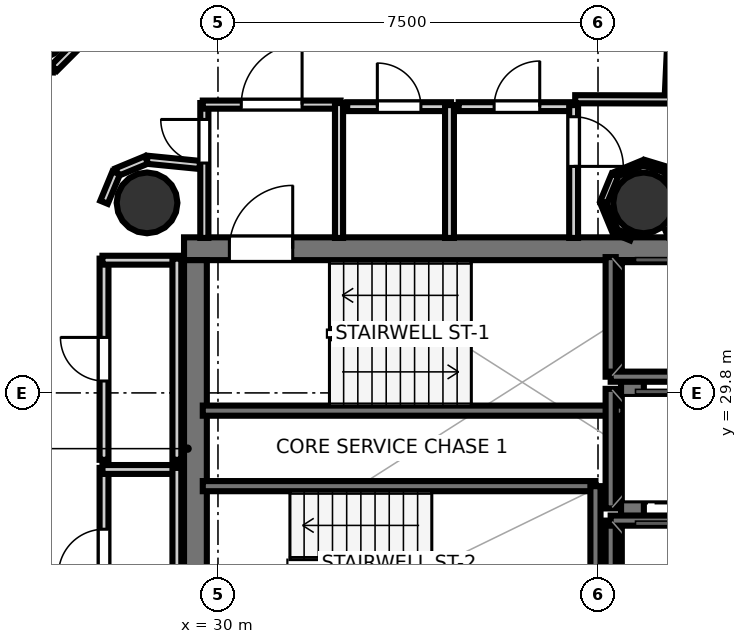
"""IFC4 building model, lengths in metres.
Left out: names, types, materials, properties, quantities, classifications, styles, units other than length and angle.
Written with IfcOpenShell. Run it as: python <this file> out.ifc"""

import sys

from ifc_helpers import new_model, si_unit, direction, frame, frame_2d, origin, origin_2d, place, context, subcontext, project, spatial, rectangle, hollow_circle, extrude, element, fill, save


model = new_model("IFC4")
c1 = context("Model", 3, precision=1e-05, world=origin(), true_north=direction((0.0, 1.0)))
c2 = subcontext(c1, "Body", "Model", "MODEL_VIEW")
j1 = project(units=[si_unit("LENGTHUNIT", "METRE"), si_unit("PLANEANGLEUNIT", "RADIAN")], contexts=[c1])
p1 = place(None, origin())
s1 = spatial("IfcSite", under=j1, at=p1, CompositionType="ELEMENT")
p2 = place(p1, origin())
s2 = spatial("IfcBuilding", under=s1, at=p2, CompositionType="ELEMENT")
p3 = place(p2, frame((0.0, 0.0, 226.2)))
s3 = spatial("IfcBuildingStorey", under=s2, at=p3, CompositionType="ELEMENT", Elevation=226.2)
p4 = place(p3, frame((29.33, 32.645, 0.0), z_axis=(0.0, 0.0, 1.0), x_axis=(1.0, 0.0, 0.0)))
e1 = element("IfcWall", 1, at=p4, inside=s3, PredefinedType="SHEAR", context=c2, shape_type="SweptSolid", body=[
    extrude(rectangle(XDim=10.52, YDim=0.45, at=frame_2d((5.26, 0.0))), origin(), (0.0, 0.0, 1.0), 3.4),
])
p5 = place(p4, frame((0.895, 0.0, 0.0)))
e2 = element("IfcOpeningElement", 2, at=p5, cuts=e1, PredefinedType="OPENING", context=c2, shape_type="SweptSolid", body=[
    extrude(rectangle(XDim=1.25, YDim=2.15, at=frame_2d((0.625, 1.075))), frame((0.0, 0.235, 0.0), z_axis=(0.0, -1.0, 0.0), x_axis=(1.0, 0.0, 0.0)), (0.0, 0.0, 1.0), 0.47),
])
for number, where, z_axis, x_axis in (
    (3, (29.555, 24.98, 0.0), (0.0, 0.0, 1.0), (0.0, 1.0, 0.0)),
    (4, (38.18, 24.98, 0.0), (0.0, 0.0, 1.0), (0.0, 1.0, 0.0)),
):
    element("IfcWall", number, at=place(p3, frame(where, z_axis=z_axis, x_axis=x_axis)), inside=s3, PredefinedType="SHEAR", context=c2, shape_type="SweptSolid", body=[
        extrude(rectangle(XDim=7.44, YDim=0.45, at=frame_2d((3.72, 0.0))), origin(), (0.0, 0.0, 1.0), 3.4),
    ])
for number, where, z_axis, x_axis in (
    (5, (28.6, 33.55, 0.0), (0.0, 0.0, 1.0), (1.0, 0.0, 0.0)),
    (6, (38.4, 33.55, 0.0), (0.0, 0.0, 1.0), (1.0, 0.0, 0.0)),
    (7, (26.431, 36.992, 0.0), (0.0, 0.0, 1.0), (1.0, 0.0, 0.0)),
):
    element("IfcColumn", number, at=place(p3, frame(where, z_axis=z_axis, x_axis=x_axis)), inside=s3, PredefinedType="COLUMN", context=c2, shape_type="SweptSolid", body=[
        extrude(hollow_circle(Radius=0.6, WallThickness=0.03, at=origin_2d()), origin(), (0.0, 0.0, 1.0), 3.7),
    ])
p6 = place(p3, frame((29.7, 29.45, 0.0), z_axis=(0.0, 0.0, 1.0), x_axis=(1.0, 0.0, 0.0)))
e8 = element("IfcWall", 8, at=p6, inside=s3, PredefinedType="SOLIDWALL", context=c2, shape_type="SweptSolid", body=[
    extrude(rectangle(XDim=8.3, YDim=0.2, at=frame_2d((4.15, 0.0))), origin(), (0.0, 0.0, 1.0), 3.4),
])
p7 = place(p3, frame((29.7, 27.96, 0.0), z_axis=(0.0, 0.0, 1.0), x_axis=(1.0, 0.0, 0.0)))
e9 = element("IfcWall", 9, at=p7, inside=s3, PredefinedType="SOLIDWALL", context=c2, shape_type="SweptSolid", body=[
    extrude(rectangle(XDim=7.75, YDim=0.2, at=frame_2d((3.875, 0.0))), origin(), (0.0, 0.0, 1.0), 3.4),
])
p8 = place(p3, frame((37.45, 24.9, 0.0), z_axis=(0.0, 0.0, 1.0), x_axis=(0.0, 1.0, 0.0)))
e10 = element("IfcWall", 10, at=p8, inside=s3, PredefinedType="SOLIDWALL", context=c2, shape_type="SweptSolid", body=[
    extrude(rectangle(XDim=3.06, YDim=0.2, at=frame_2d((1.53, 0.0))), origin(), (0.0, 0.0, 1.0), 3.4),
])
p9 = place(p3, frame((37.75, 30.12, 0.0), z_axis=(0.0, 0.0, 1.0), x_axis=(0.0, 1.0, 0.0)))
e11 = element("IfcWall", 11, at=p9, inside=s3, PredefinedType="SOLIDWALL", context=c2, shape_type="SweptSolid", body=[
    extrude(rectangle(XDim=2.36, YDim=0.2, at=frame_2d((1.18, 0.0))), origin(), (0.0, 0.0, 1.0), 3.4),
])
p10 = place(p3, frame((37.75, 30.12, 0.0), z_axis=(0.0, 0.0, 1.0), x_axis=(1.0, 0.0, 0.0)))
e12 = element("IfcWall", 12, at=p10, inside=s3, PredefinedType="SOLIDWALL", context=c2, shape_type="SweptSolid", body=[
    extrude(rectangle(XDim=2.1, YDim=0.2, at=frame_2d((1.05, 0.0))), origin(), (0.0, 0.0, 1.0), 3.4),
])
p11 = place(p3, frame((37.75, 24.92, 0.0), z_axis=(0.0, 0.0, 1.0), x_axis=(0.0, 1.0, 0.0)))
e13 = element("IfcWall", 13, at=p11, inside=s3, PredefinedType="SOLIDWALL", context=c2, shape_type="SweptSolid", body=[
    extrude(rectangle(XDim=2.36, YDim=0.2, at=frame_2d((1.18, 0.0))), origin(), (0.0, 0.0, 1.0), 3.4),
])
p12 = place(p3, frame((37.75, 27.28, 0.0), z_axis=(0.0, 0.0, 1.0), x_axis=(1.0, 0.0, 0.0)))
e14 = element("IfcWall", 14, at=p12, inside=s3, PredefinedType="SOLIDWALL", context=c2, shape_type="SweptSolid", body=[
    extrude(rectangle(XDim=2.1, YDim=0.2, at=frame_2d((1.05, 0.0))), origin(), (0.0, 0.0, 1.0), 3.4),
])
p13 = place(p3, frame((37.75, 27.52, 0.0), z_axis=(0.0, 0.0, 1.0), x_axis=(0.0, 1.0, 0.0)))
e15 = element("IfcWall", 15, at=p13, inside=s3, PredefinedType="SOLIDWALL", context=c2, shape_type="SweptSolid", body=[
    extrude(rectangle(XDim=2.36, YDim=0.2, at=frame_2d((1.18, 0.0))), origin(), (0.0, 0.0, 1.0), 3.4),
])
p14 = place(p3, frame((29.731, 32.858, 0.0), z_axis=(0.0, 0.0, 1.0), x_axis=(0.0, 1.0, 0.0)))
e16 = element("IfcWall", 16, at=p14, inside=s3, PredefinedType="PARTITIONING", context=c2, shape_type="SweptSolid", body=[
    extrude(rectangle(XDim=2.662, YDim=0.16, at=frame_2d((1.331, 0.0))), origin(), (0.0, 0.0, 1.0), 2.72),
])
p15 = place(p14, frame((1.478, 0.0, 0.0)))
e17 = element("IfcOpeningElement", 17, at=p15, cuts=e16, PredefinedType="OPENING", context=c2, shape_type="SweptSolid", body=[
    extrude(rectangle(XDim=0.86, YDim=2.05, at=frame_2d((0.43, 1.025))), frame((0.0, 0.09, 0.0), z_axis=(0.0, -1.0, 0.0), x_axis=(1.0, 0.0, 0.0)), (0.0, 0.0, 1.0), 0.18),
])
p16 = place(p3, frame((29.7, 35.489, 0.0), z_axis=(0.0, 0.0, 1.0), x_axis=(1.0, 0.0, 0.0)))
e18 = element("IfcWall", 18, at=p16, inside=s3, PredefinedType="PARTITIONING", context=c2, shape_type="SweptSolid", body=[
    extrude(rectangle(XDim=2.72, YDim=0.16, at=frame_2d((1.36, 0.0))), origin(), (0.0, 0.0, 1.0), 2.72),
])
p17 = place(p16, frame((0.76, 0.0, 0.0)))
e19 = element("IfcOpeningElement", 19, at=p17, cuts=e18, PredefinedType="OPENING", context=c2, shape_type="SweptSolid", body=[
    extrude(rectangle(XDim=1.2, YDim=2.15, at=frame_2d((0.6, 1.075))), frame((0.0, 0.09, 0.0), z_axis=(0.0, -1.0, 0.0), x_axis=(1.0, 0.0, 0.0)), (0.0, 0.0, 1.0), 0.18),
])
p18 = place(p3, frame((32.389, 35.52, 0.0), z_axis=(0.0, 0.0, 1.0), x_axis=(0.0, -1.0, 0.0)))
e20 = element("IfcWall", 20, at=p18, inside=s3, PredefinedType="PARTITIONING", context=c2, shape_type="SweptSolid", body=[
    extrude(rectangle(XDim=2.662, YDim=0.16, at=frame_2d((1.331, 0.0))), origin(), (0.0, 0.0, 1.0), 2.72),
])
p19 = place(p3, frame((32.55, 35.449, 0.0), z_axis=(0.0, 0.0, 1.0), x_axis=(1.0, 0.0, 0.0)))
e21 = element("IfcWall", 21, at=p19, inside=s3, PredefinedType="PLUMBINGWALL", context=c2, shape_type="SweptSolid", body=[
    extrude(rectangle(XDim=2.05, YDim=0.175, at=frame_2d((1.025, 0.0))), origin(), (0.0, 0.0, 1.0), 2.72),
])
p20 = place(p19, frame((0.595, 0.0, 0.0)))
e22 = element("IfcOpeningElement", 22, at=p20, cuts=e21, PredefinedType="OPENING", context=c2, shape_type="SweptSolid", body=[
    extrude(rectangle(XDim=0.86, YDim=2.05, at=frame_2d((0.43, 1.025))), frame((0.0, 0.097, 0.0), z_axis=(0.0, -1.0, 0.0), x_axis=(1.0, 0.0, 0.0)), (0.0, 0.0, 1.0), 0.195),
])
p21 = place(p3, frame((34.569, 35.48, 0.0), z_axis=(0.0, 0.0, 1.0), x_axis=(0.0, -1.0, 0.0)))
e23 = element("IfcWall", 23, at=p21, inside=s3, PredefinedType="PLUMBINGWALL", context=c2, shape_type="SweptSolid", body=[
    extrude(rectangle(XDim=2.622, YDim=0.175, at=frame_2d((1.311, 0.0))), origin(), (0.0, 0.0, 1.0), 2.72),
])
p22 = place(p3, frame((34.75, 35.449, 0.0), z_axis=(0.0, 0.0, 1.0), x_axis=(1.0, 0.0, 0.0)))
e24 = element("IfcWall", 24, at=p22, inside=s3, PredefinedType="PLUMBINGWALL", context=c2, shape_type="SweptSolid", body=[
    extrude(rectangle(XDim=2.3, YDim=0.175, at=frame_2d((1.15, 0.0))), origin(), (0.0, 0.0, 1.0), 2.72),
])
p23 = place(p22, frame((0.7, 0.0, 0.0)))
e25 = element("IfcOpeningElement", 25, at=p23, cuts=e24, PredefinedType="OPENING", context=c2, shape_type="SweptSolid", body=[
    extrude(rectangle(XDim=0.9, YDim=2.1, at=frame_2d((0.45, 1.05))), frame((0.0, 0.097, 0.0), z_axis=(0.0, -1.0, 0.0), x_axis=(1.0, 0.0, 0.0)), (0.0, 0.0, 1.0), 0.195),
])
p24 = place(p3, frame((37.019, 35.48, 0.0), z_axis=(0.0, 0.0, 1.0), x_axis=(0.0, -1.0, 0.0)))
e26 = element("IfcWall", 26, at=p24, inside=s3, PredefinedType="PLUMBINGWALL", context=c2, shape_type="SweptSolid", body=[
    extrude(rectangle(XDim=2.622, YDim=0.175, at=frame_2d((1.311, 0.0))), origin(), (0.0, 0.0, 1.0), 2.72),
])
p25 = place(p24, frame((0.23, 0.0, 0.0)))
e27 = element("IfcOpeningElement", 27, at=p25, cuts=e26, PredefinedType="OPENING", context=c2, shape_type="SweptSolid", body=[
    extrude(rectangle(XDim=0.98, YDim=2.1, at=frame_2d((0.49, 1.05))), frame((0.0, 0.097, 0.0), z_axis=(0.0, -1.0, 0.0), x_axis=(1.0, 0.0, 0.0)), (0.0, 0.0, 1.0), 0.195),
])
p26 = place(p3, frame((27.751, 25.0, 0.0), z_axis=(0.0, 0.0, 1.0), x_axis=(0.0, 1.0, 0.0)))
e28 = element("IfcWall", 28, at=p26, inside=s3, PredefinedType="PLUMBINGWALL", context=c2, shape_type="SweptSolid", body=[
    extrude(rectangle(XDim=3.32, YDim=0.175, at=frame_2d((1.66, 0.0))), origin(), (0.0, 0.0, 1.0), 2.72),
])
p27 = place(p26, frame((1.21, 0.0, 0.0)))
e29 = element("IfcOpeningElement", 29, at=p27, cuts=e28, PredefinedType="OPENING", context=c2, shape_type="SweptSolid", body=[
    extrude(rectangle(XDim=0.9, YDim=2.1, at=frame_2d((0.45, 1.05))), frame((0.0, 0.097, 0.0), z_axis=(0.0, -1.0, 0.0), x_axis=(1.0, 0.0, 0.0)), (0.0, 0.0, 1.0), 0.195),
])
p28 = place(p3, frame((27.72, 28.289, 0.0), z_axis=(0.0, 0.0, 1.0), x_axis=(1.0, 0.0, 0.0)))
e30 = element("IfcWall", 30, at=p28, inside=s3, PredefinedType="PLUMBINGWALL", context=c2, shape_type="SweptSolid", body=[
    extrude(rectangle(XDim=1.5, YDim=0.175, at=frame_2d((0.75, 0.0))), origin(), (0.0, 0.0, 1.0), 2.72),
])
p29 = place(p3, frame((29.189, 28.32, 0.0), z_axis=(0.0, 0.0, 1.0), x_axis=(0.0, -1.0, 0.0)))
e31 = element("IfcWall", 31, at=p29, inside=s3, PredefinedType="PLUMBINGWALL", context=c2, shape_type="SweptSolid", body=[
    extrude(rectangle(XDim=3.32, YDim=0.175, at=frame_2d((1.66, 0.0))), origin(), (0.0, 0.0, 1.0), 2.72),
])
p30 = place(p3, frame((27.751, 28.48, 0.0), z_axis=(0.0, 0.0, 1.0), x_axis=(0.0, 1.0, 0.0)))
e32 = element("IfcWall", 32, at=p30, inside=s3, PredefinedType="PLUMBINGWALL", context=c2, shape_type="SweptSolid", body=[
    extrude(rectangle(XDim=3.97, YDim=0.175, at=frame_2d((1.985, 0.0))), origin(), (0.0, 0.0, 1.0), 2.72),
])
p31 = place(p30, frame((1.555, 0.0, 0.0)))
e33 = element("IfcOpeningElement", 33, at=p31, cuts=e32, PredefinedType="OPENING", context=c2, shape_type="SweptSolid", body=[
    extrude(rectangle(XDim=0.86, YDim=2.05, at=frame_2d((0.43, 1.025))), frame((0.0, 0.097, 0.0), z_axis=(0.0, -1.0, 0.0), x_axis=(1.0, 0.0, 0.0)), (0.0, 0.0, 1.0), 0.195),
])
p32 = place(p3, frame((27.72, 32.419, 0.0), z_axis=(0.0, 0.0, 1.0), x_axis=(1.0, 0.0, 0.0)))
e34 = element("IfcWall", 34, at=p32, inside=s3, PredefinedType="PLUMBINGWALL", context=c2, shape_type="SweptSolid", body=[
    extrude(rectangle(XDim=1.5, YDim=0.175, at=frame_2d((0.75, 0.0))), origin(), (0.0, 0.0, 1.0), 2.72),
])
p33 = place(p3, frame((29.189, 32.45, 0.0), z_axis=(0.0, 0.0, 1.0), x_axis=(0.0, -1.0, 0.0)))
e35 = element("IfcWall", 35, at=p33, inside=s3, PredefinedType="PLUMBINGWALL", context=c2, shape_type="SweptSolid", body=[
    extrude(rectangle(XDim=3.97, YDim=0.175, at=frame_2d((1.985, 0.0))), origin(), (0.0, 0.0, 1.0), 2.72),
])
p34 = place(p3, frame((38.979, 37.424, 0.0), z_axis=(0.0, 0.0, 1.0), x_axis=(-0.046339891036, -0.998925730222, 0.0)))
e36 = element("IfcWall", 36, at=p34, inside=s3, PredefinedType="PARTITIONING", context=c2, shape_type="SweptSolid", body=[
    extrude(rectangle(XDim=1.865, YDim=0.16, at=frame_2d((0.933, 0.0))), origin(), (0.0, 0.0, 1.0), 2.72),
])
p35 = place(p3, frame((38.924, 35.591, 0.0), z_axis=(0.0, 0.0, 1.0), x_axis=(-0.999997249133, 0.002345576034, 0.0)))
e37 = element("IfcWall", 37, at=p35, inside=s3, PredefinedType="PARTITIONING", context=c2, shape_type="SweptSolid", body=[
    extrude(rectangle(XDim=1.874, YDim=0.16, at=frame_2d((0.937, 0.0))), origin(), (0.0, 0.0, 1.0), 2.72),
])
p36 = place(p3, frame((29.641, 34.299, 0.0), z_axis=(0.0, 0.0, 1.0), x_axis=(-0.995179827095, 0.098066873836, 0.0)))
e38 = element("IfcWall", 38, at=p36, inside=s3, PredefinedType="PARTITIONING", context=c2, shape_type="SweptSolid", body=[
    extrude(rectangle(XDim=1.043, YDim=0.16, at=frame_2d((0.521, 0.0))), origin(), (0.0, 0.0, 1.0), 2.72),
])
p37 = place(p3, frame((28.588, 34.399, 0.0), z_axis=(0.0, 0.0, 1.0), x_axis=(-0.923846138666, -0.382764042293, 0.0)))
e39 = element("IfcWall", 39, at=p37, inside=s3, PredefinedType="PARTITIONING", context=c2, shape_type="SweptSolid", body=[
    extrude(rectangle(XDim=0.628, YDim=0.16, at=frame_2d((0.314, 0.0))), origin(), (0.0, 0.0, 1.0), 2.72),
])
p38 = place(p3, frame((27.991, 34.142, 0.0), z_axis=(0.0, 0.0, 1.0), x_axis=(-0.382569489008, -0.923926721164, 0.0)))
e40 = element("IfcWall", 40, at=p38, inside=s3, PredefinedType="PARTITIONING", context=c2, shape_type="SweptSolid", body=[
    extrude(rectangle(XDim=0.627, YDim=0.16, at=frame_2d((0.313, 0.0))), origin(), (0.0, 0.0, 1.0), 2.72),
])
p39 = place(p3, frame((25.449, 36.238, 0.0), z_axis=(0.0, 0.0, 1.0), x_axis=(0.999651698073, -0.026390955635, 0.0)))
e41 = element("IfcWall", 41, at=p39, inside=s3, PredefinedType="PARTITIONING", context=c2, shape_type="SweptSolid", body=[
    extrude(rectangle(XDim=1.295, YDim=0.16, at=frame_2d((0.647, 0.0))), origin(), (0.0, 0.0, 1.0), 2.72),
])
p40 = place(p3, frame((26.767, 36.212, 0.0), z_axis=(0.0, 0.0, 1.0), x_axis=(0.707106781187, 0.707106781187, 0.0)))
e42 = element("IfcWall", 42, at=p40, inside=s3, PredefinedType="PARTITIONING", context=c2, shape_type="SweptSolid", body=[
    extrude(rectangle(XDim=0.628, YDim=0.16, at=frame_2d((0.314, 0.0))), origin(), (0.0, 0.0, 1.0), 2.72),
])
p41 = place(p3, frame((39.166, 33.733, 0.0), z_axis=(0.0, 0.0, 1.0), x_axis=(-0.563162199293, 0.826346378517, 0.0)))
e43 = element("IfcWall", 43, at=p41, inside=s3, PredefinedType="PARTITIONING", context=c2, shape_type="SweptSolid", body=[
    extrude(rectangle(XDim=0.564, YDim=0.14, at=frame_2d((0.282, 0.0))), origin(), (0.0, 0.0, 1.0), 2.72),
])
p42 = place(p3, frame((38.831, 34.212, 0.0), z_axis=(0.0, 0.0, 1.0), x_axis=(-0.957061618741, 0.289884559665, 0.0)))
e44 = element("IfcWall", 44, at=p42, inside=s3, PredefinedType="PARTITIONING", context=c2, shape_type="SweptSolid", body=[
    extrude(rectangle(XDim=0.441, YDim=0.12, at=frame_2d((0.221, 0.0))), origin(), (0.0, 0.0, 1.0), 2.72),
])
p43 = place(p3, frame((38.388, 34.339, 0.0), z_axis=(0.0, 0.0, 1.0), x_axis=(-0.923894108428, -0.382648241093, 0.0)))
e45 = element("IfcWall", 45, at=p43, inside=s3, PredefinedType="PARTITIONING", context=c2, shape_type="SweptSolid", body=[
    extrude(rectangle(XDim=0.582, YDim=0.105, at=frame_2d((0.291, 0.0))), origin(), (0.0, 0.0, 1.0), 2.72),
])
p44 = place(p3, frame((37.834, 34.099, 0.0), z_axis=(0.0, 0.0, 1.0), x_axis=(-0.382796622927, -0.923832639322, 0.0)))
e46 = element("IfcWall", 46, at=p44, inside=s3, PredefinedType="PARTITIONING", context=c2, shape_type="SweptSolid", body=[
    extrude(rectangle(XDim=0.582, YDim=0.14, at=frame_2d((0.291, 0.0))), origin(), (0.0, 0.0, 1.0), 2.72),
])
p45 = place(p3, frame((37.611, 33.538, 0.0), z_axis=(0.0, 0.0, 1.0), x_axis=(0.382796622927, -0.923832639322, 0.0)))
e47 = element("IfcWall", 47, at=p45, inside=s3, PredefinedType="PARTITIONING", context=c2, shape_type="SweptSolid", body=[
    extrude(rectangle(XDim=0.582, YDim=0.12, at=frame_2d((0.291, 0.0))), origin(), (0.0, 0.0, 1.0), 2.72),
])
p46 = place(p3, frame((37.851, 32.984, 0.0), z_axis=(0.0, 0.0, 1.0), x_axis=(0.923908393326, -0.382613748761, 0.0)))
e48 = element("IfcWall", 48, at=p46, inside=s3, PredefinedType="PARTITIONING", context=c2, shape_type="SweptSolid", body=[
    extrude(rectangle(XDim=0.329, YDim=0.105, at=frame_2d((0.165, 0.0))), origin(), (0.0, 0.0, 1.0), 2.72),
])
p47 = place(p3, frame((38.855, 32.945, 0.0), z_axis=(0.0, 0.0, 1.0), x_axis=(0.924628481531, 0.380870281252, 0.0)))
e49 = element("IfcWall", 49, at=p47, inside=s3, PredefinedType="PARTITIONING", context=c2, shape_type="SweptSolid", body=[
    extrude(rectangle(XDim=0.102, YDim=0.14, at=frame_2d((0.051, 0.0))), origin(), (0.0, 0.0, 1.0), 2.72),
])
p48 = place(p5, origin())
e50 = element("IfcDoor", 50, at=p48, inside=s3, OperationType="SINGLE_SWING_RIGHT", PredefinedType="DOOR", context=c2, shape_type="SweptSolid", body=[
    extrude(rectangle(XDim=1.25, YDim=2.15, at=frame_2d((0.625, 1.075))), frame((0.0, 0.025, 0.0), z_axis=(0.0, -1.0, 0.0), x_axis=(1.0, 0.0, 0.0)), (0.0, 0.0, 1.0), 0.05),
])
fill(e2, e50)
p49 = place(p17, origin())
e51 = element("IfcDoor", 51, at=p49, inside=s3, OperationType="SINGLE_SWING_RIGHT", PredefinedType="DOOR", context=c2, shape_type="SweptSolid", body=[
    extrude(rectangle(XDim=1.2, YDim=2.15, at=frame_2d((0.6, 1.075))), frame((0.0, 0.025, 0.0), z_axis=(0.0, -1.0, 0.0), x_axis=(1.0, 0.0, 0.0)), (0.0, 0.0, 1.0), 0.05),
])
fill(e19, e51)
p50 = place(p20, origin())
e52 = element("IfcDoor", 52, at=p50, inside=s3, OperationType="SINGLE_SWING_LEFT", PredefinedType="DOOR", context=c2, shape_type="SweptSolid", body=[
    extrude(rectangle(XDim=0.86, YDim=2.05, at=frame_2d((0.43, 1.025))), frame((0.0, 0.025, 0.0), z_axis=(0.0, -1.0, 0.0), x_axis=(1.0, 0.0, 0.0)), (0.0, 0.0, 1.0), 0.05),
])
fill(e22, e52)
p51 = place(p23, origin())
e53 = element("IfcDoor", 53, at=p51, inside=s3, OperationType="SINGLE_SWING_RIGHT", PredefinedType="DOOR", context=c2, shape_type="SweptSolid", body=[
    extrude(rectangle(XDim=0.9, YDim=2.1, at=frame_2d((0.45, 1.05))), frame((0.0, 0.025, 0.0), z_axis=(0.0, -1.0, 0.0), x_axis=(1.0, 0.0, 0.0)), (0.0, 0.0, 1.0), 0.05),
])
fill(e25, e53)
p52 = place(p27, origin())
e54 = element("IfcDoor", 54, at=p52, inside=s3, OperationType="SINGLE_SWING_LEFT", PredefinedType="DOOR", context=c2, shape_type="SweptSolid", body=[
    extrude(rectangle(XDim=0.9, YDim=2.1, at=frame_2d((0.45, 1.05))), frame((0.0, 0.025, 0.0), z_axis=(0.0, -1.0, 0.0), x_axis=(1.0, 0.0, 0.0)), (0.0, 0.0, 1.0), 0.05),
])
fill(e29, e54)
p53 = place(p31, origin())
e55 = element("IfcDoor", 55, at=p53, inside=s3, OperationType="SINGLE_SWING_RIGHT", PredefinedType="DOOR", context=c2, shape_type="SweptSolid", body=[
    extrude(rectangle(XDim=0.86, YDim=2.05, at=frame_2d((0.43, 1.025))), frame((0.0, 0.025, 0.0), z_axis=(0.0, -1.0, 0.0), x_axis=(1.0, 0.0, 0.0)), (0.0, 0.0, 1.0), 0.05),
])
fill(e33, e55)
p54 = place(p15, origin())
e56 = element("IfcDoor", 56, at=p54, inside=s3, OperationType="SINGLE_SWING_RIGHT", PredefinedType="DOOR", context=c2, shape_type="SweptSolid", body=[
    extrude(rectangle(XDim=0.86, YDim=2.05, at=frame_2d((0.43, 1.025))), frame((0.0, 0.025, 0.0), z_axis=(0.0, -1.0, 0.0), x_axis=(1.0, 0.0, 0.0)), (0.0, 0.0, 1.0), 0.05),
])
fill(e17, e56)
p55 = place(p25, origin())
e57 = element("IfcDoor", 57, at=p55, inside=s3, OperationType="SINGLE_SWING_RIGHT", PredefinedType="DOOR", context=c2, shape_type="SweptSolid", body=[
    extrude(rectangle(XDim=0.98, YDim=2.1, at=frame_2d((0.49, 1.05))), frame((0.0, 0.025, 0.0), z_axis=(0.0, -1.0, 0.0), x_axis=(1.0, 0.0, 0.0)), (0.0, 0.0, 1.0), 0.05),
])
fill(e27, e57)
save(model, sys.argv[1])
